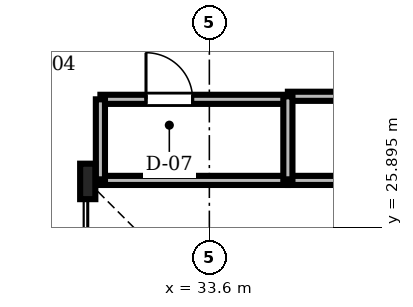
"""IFC4 building model, lengths in metres.
Left out: names, types, materials, properties, quantities, classifications, styles, units other than length and angle.
Written with IfcOpenShell. Run it as: python <this file> out.ifc"""

import sys

from ifc_helpers import new_model, si_unit, direction, frame, frame_2d, origin, origin_2d, place, context, subcontext, project, spatial, rectangle, i_section, extrude, source, transform, mapped, element, fill, save


model = new_model("IFC4")
c1 = context("Model", 3, precision=1e-05, world=origin(), true_north=direction((0.0, 1.0)))
c2 = subcontext(c1, "Body", "Model", "MODEL_VIEW")
j1 = project(units=[si_unit("LENGTHUNIT", "METRE"), si_unit("PLANEANGLEUNIT", "RADIAN")], contexts=[c1])
p1 = place(None, origin())
s1 = spatial("IfcSite", under=j1, at=p1, CompositionType="ELEMENT")
p2 = place(p1, origin())
s2 = spatial("IfcBuilding", under=s1, at=p2, CompositionType="ELEMENT")
p3 = place(p2, frame((0.0, 0.0, 196.05)))
s3 = spatial("IfcBuildingStorey", under=s2, at=p3, CompositionType="ELEMENT", Elevation=196.05)
m1 = source(origin(), c2, "Body", "SweptSolid", [
    extrude(i_section(OverallWidth=0.3, OverallDepth=0.7, WebThickness=0.017, FlangeThickness=0.032, FilletRadius=0.027, at=origin_2d()), origin(), (0.0, 0.0, 1.0), 3.53),
])
p4 = place(p3, frame((31.2, 26.8, 0.0), z_axis=(0.0, 0.0, 1.0), x_axis=(1.0, 0.0, 0.0)))
e1 = element("IfcColumn", 1, at=p4, inside=s3, PredefinedType="COLUMN", context=c2, shape_type="MappedRepresentation", body=[
    mapped(m1, transform((0.0, 0.0, 0.0), scale=1.0)),
])
m2 = source(origin(), c2, "Body", "SweptSolid", [
    extrude(rectangle(XDim=3.7, YDim=0.18, at=frame_2d((1.85, 0.0))), origin(), (0.0, 0.0, 1.0), 3.162),
])
p5 = place(p3, frame((31.45, 28.42, 0.0), z_axis=(0.0, 0.0, 1.0), x_axis=(1.0, 0.0, 0.0)))
e2 = element("IfcWall", 2, at=p5, inside=s3, PredefinedType="PARTITIONING", context=c2, shape_type="MappedRepresentation", body=[
    mapped(m2, transform((0.0, 0.0, 0.0), scale=1.0)),
])
m3 = source(origin(), c2, "Body", "SweptSolid", [
    extrude(rectangle(XDim=0.92, YDim=2.1, at=frame_2d((0.46, 1.05))), frame((0.0, 0.1, 0.0), z_axis=(0.0, -1.0, 0.0), x_axis=(1.0, 0.0, 0.0)), (0.0, 0.0, 1.0), 0.2),
])
p6 = place(p5, frame((0.9, 0.0, 0.0)))
e3 = element("IfcOpeningElement", 3, at=p6, cuts=e2, PredefinedType="OPENING", context=c2, shape_type="MappedRepresentation", body=[
    mapped(m3, transform((0.0, 0.0, 0.0), scale=1.0)),
])
m4 = source(origin(), c2, "Body", "SweptSolid", [
    extrude(rectangle(XDim=3.37, YDim=0.18, at=frame_2d((1.685, 0.0))), origin(), (0.0, 0.0, 1.0), 3.53),
])
p7 = place(p3, frame((35.15, 28.48, 0.0), z_axis=(0.0, 0.0, 1.0), x_axis=(1.0, 0.0, 0.0)))
e4 = element("IfcWall", 4, at=p7, inside=s3, PredefinedType="PARTITIONING", context=c2, shape_type="MappedRepresentation", body=[
    mapped(m4, transform((0.0, 0.0, 0.0), scale=1.0)),
])
m5 = source(origin(), c2, "Body", "SweptSolid", [
    extrude(rectangle(XDim=0.95, YDim=2.15, at=frame_2d((0.475, 1.075))), frame((0.0, 0.1, 0.0), z_axis=(0.0, -1.0, 0.0), x_axis=(1.0, 0.0, 0.0)), (0.0, 0.0, 1.0), 0.2),
])
p8 = place(p7, frame((1.775, 0.0, 0.0)))
e5 = element("IfcOpeningElement", 5, at=p8, cuts=e4, PredefinedType="OPENING", context=c2, shape_type="MappedRepresentation", body=[
    mapped(m5, transform((0.0, 0.0, 0.0), scale=1.0)),
])
m6 = source(origin(), c2, "Body", "SweptSolid", [
    extrude(rectangle(XDim=3.7, YDim=0.18, at=frame_2d((1.85, 0.0))), origin(), (0.0, 0.0, 1.0), 3.072),
])
p9 = place(p3, frame((31.45, 26.82, 0.0), z_axis=(0.0, 0.0, 1.0), x_axis=(1.0, 0.0, 0.0)))
e6 = element("IfcWall", 6, at=p9, inside=s3, PredefinedType="PARTITIONING", context=c2, shape_type="MappedRepresentation", body=[
    mapped(m6, transform((0.0, 0.0, 0.0), scale=1.0)),
])
m7 = source(origin(), c2, "Body", "SweptSolid", [
    extrude(rectangle(XDim=3.37, YDim=0.18, at=frame_2d((1.685, 0.0))), origin(), (0.0, 0.0, 1.0), 3.072),
])
p10 = place(p3, frame((35.15, 26.82, 0.0), z_axis=(0.0, 0.0, 1.0), x_axis=(1.0, 0.0, 0.0)))
e7 = element("IfcWall", 7, at=p10, inside=s3, PredefinedType="PARTITIONING", context=c2, shape_type="MappedRepresentation", body=[
    mapped(m7, transform((0.0, 0.0, 0.0), scale=1.0)),
])
m8 = source(origin(), c2, "Body", "SweptSolid", [
    extrude(rectangle(XDim=1.66, YDim=0.18, at=frame_2d((0.83, 0.0))), origin(), (0.0, 0.0, 1.0), 3.072),
])
p11 = place(p3, frame((35.15, 26.82, 0.0), z_axis=(0.0, 0.0, 1.0), x_axis=(0.0, 1.0, 0.0)))
e8 = element("IfcWall", 8, at=p11, inside=s3, PredefinedType="PARTITIONING", context=c2, shape_type="MappedRepresentation", body=[
    mapped(m8, transform((0.0, 0.0, 0.0), scale=1.0)),
])
m9 = source(origin(), c2, "Body", "SweptSolid", [
    extrude(rectangle(XDim=1.6, YDim=0.18, at=frame_2d((0.8, 0.0))), origin(), (0.0, 0.0, 1.0), 3.072),
])
p12 = place(p3, frame((31.45, 26.82, 0.0), z_axis=(0.0, 0.0, 1.0), x_axis=(0.0, 1.0, 0.0)))
e9 = element("IfcWall", 9, at=p12, inside=s3, PredefinedType="PARTITIONING", context=c2, shape_type="MappedRepresentation", body=[
    mapped(m9, transform((0.0, 0.0, 0.0), scale=1.0)),
])
m10 = source(origin(), c2, "Body", "SweptSolid", [
    extrude(rectangle(XDim=0.92, YDim=2.1, at=frame_2d((0.46, 1.05))), frame((0.0, 0.025, 0.0), z_axis=(0.0, -1.0, 0.0), x_axis=(1.0, 0.0, 0.0)), (0.0, 0.0, 1.0), 0.05),
])
p13 = place(p6, origin())
e10 = element("IfcDoor", 10, at=p13, inside=s3, OperationType="SINGLE_SWING_LEFT", PredefinedType="DOOR", context=c2, shape_type="MappedRepresentation", body=[
    mapped(m10, transform((0.0, 0.0, 0.0), scale=1.0)),
])
fill(e3, e10)
save(model, sys.argv[1])
